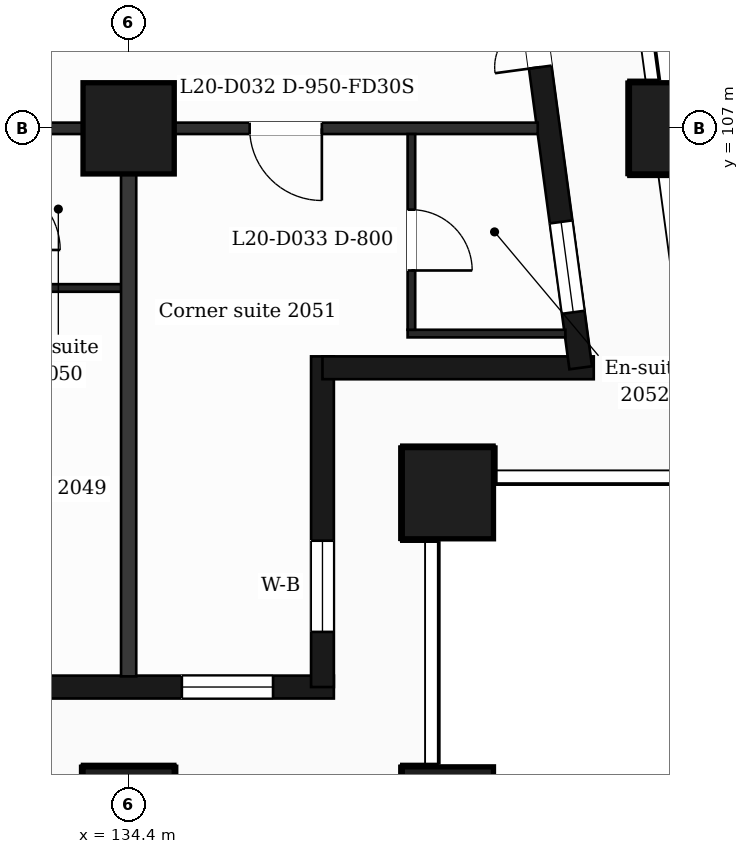
"""IFC4 building model, lengths in metres.
Left out: names, types, materials, properties, quantities, classifications, styles, units other than length and angle.
Written with IfcOpenShell. Run it as: python <this file> out.ifc"""

import sys

from ifc_helpers import new_model, si_unit, direction, frame, frame_2d, origin, origin_2d, place, context, subcontext, project, spatial, rectangle, extrude, element, fill, save


model = new_model("IFC4")
c1 = context("Model", 3, precision=1e-05, world=origin(), true_north=direction((0.0, 1.0)))
c2 = subcontext(c1, "Body", "Model", "MODEL_VIEW")
j1 = project(units=[si_unit("LENGTHUNIT", "METRE"), si_unit("PLANEANGLEUNIT", "RADIAN")], contexts=[c1])
p1 = place(None, origin())
s1 = spatial("IfcSite", under=j1, at=p1, CompositionType="ELEMENT")
p2 = place(p1, origin())
s2 = spatial("IfcBuilding", under=s1, at=p2, CompositionType="ELEMENT")
p3 = place(p2, frame((0.0, 0.0, 91.0)))
s3 = spatial("IfcBuildingStorey", under=s2, at=p3, CompositionType="ELEMENT", Elevation=91.0)
for number, where, z_axis, x_axis in (
    (1, (134.4, 98.0, 0.0), (0.0, 0.0, 1.0), (1.0, 0.0, 0.0)),
    (2, (138.6, 98.0, 0.0), (0.0, 0.0, 1.0), (1.0, 0.0, 0.0)),
    (3, (138.6, 102.2, 0.0), (0.0, 0.0, 1.0), (1.0, 0.0, 0.0)),
    (4, (134.4, 107.0, 0.0), (0.0, 0.0, 1.0), (1.0, 0.0, 0.0)),
    (5, (141.588, 107.0, 0.0), (0.0, 0.0, 1.0), (1.0, 0.0, 0.0)),
):
    element("IfcColumn", number, at=place(p3, frame(where, z_axis=z_axis, x_axis=x_axis)), inside=s3, PredefinedType="COLUMN", context=c2, shape_type="SweptSolid", body=[
        extrude(rectangle(XDim=1.2, YDim=1.2, at=origin_2d()), origin(), (0.0, 0.0, 1.0), 3.7),
    ])
p4 = place(p3, frame((89.85, 99.65, 0.0), z_axis=(0.0, 0.0, 1.0), x_axis=(1.0, 0.0, 0.0)))
e6 = element("IfcWall", 6, at=p4, inside=s3, PredefinedType="SOLIDWALL", context=c2, shape_type="SweptSolid", body=[
    extrude(rectangle(XDim=47.25, YDim=0.3, at=frame_2d((23.625, 0.0))), origin(), (0.0, 0.0, 1.0), 3.38),
])
p5 = place(p4, frame((0.725, 0.0, 0.9)))
e7 = element("IfcOpeningElement", 7, at=p5, cuts=e6, PredefinedType="OPENING", context=c2, shape_type="SweptSolid", body=[
    extrude(rectangle(XDim=1.2, YDim=2.1, at=frame_2d((0.6, 1.05))), frame((0.0, 0.16, 0.0), z_axis=(0.0, -1.0, 0.0), x_axis=(1.0, 0.0, 0.0)), (0.0, 0.0, 1.0), 0.32),
])
p6 = place(p4, frame((3.45, 0.0, 0.9)))
e8 = element("IfcOpeningElement", 8, at=p6, cuts=e6, PredefinedType="OPENING", context=c2, shape_type="SweptSolid", body=[
    extrude(rectangle(XDim=2.4, YDim=2.1, at=frame_2d((1.2, 1.05))), frame((0.0, 0.16, 0.0), z_axis=(0.0, -1.0, 0.0), x_axis=(1.0, 0.0, 0.0)), (0.0, 0.0, 1.0), 0.32),
])
p7 = place(p4, frame((7.65, 0.0, 0.9)))
e9 = element("IfcOpeningElement", 9, at=p7, cuts=e6, PredefinedType="OPENING", context=c2, shape_type="SweptSolid", body=[
    extrude(rectangle(XDim=2.4, YDim=2.1, at=frame_2d((1.2, 1.05))), frame((0.0, 0.16, 0.0), z_axis=(0.0, -1.0, 0.0), x_axis=(1.0, 0.0, 0.0)), (0.0, 0.0, 1.0), 0.32),
])
p8 = place(p4, frame((12.45, 0.0, 0.9)))
e10 = element("IfcOpeningElement", 10, at=p8, cuts=e6, PredefinedType="OPENING", context=c2, shape_type="SweptSolid", body=[
    extrude(rectangle(XDim=1.2, YDim=2.1, at=frame_2d((0.6, 1.05))), frame((0.0, 0.16, 0.0), z_axis=(0.0, -1.0, 0.0), x_axis=(1.0, 0.0, 0.0)), (0.0, 0.0, 1.0), 0.32),
])
p9 = place(p4, frame((16.65, 0.0, 0.9)))
e11 = element("IfcOpeningElement", 11, at=p9, cuts=e6, PredefinedType="OPENING", context=c2, shape_type="SweptSolid", body=[
    extrude(rectangle(XDim=1.2, YDim=2.1, at=frame_2d((0.6, 1.05))), frame((0.0, 0.16, 0.0), z_axis=(0.0, -1.0, 0.0), x_axis=(1.0, 0.0, 0.0)), (0.0, 0.0, 1.0), 0.32),
])
p10 = place(p4, frame((19.95, 0.0, 0.0)))
e12 = element("IfcOpeningElement", 12, at=p10, cuts=e6, PredefinedType="OPENING", context=c2, shape_type="SweptSolid", body=[
    extrude(rectangle(XDim=1.2, YDim=2.4, at=frame_2d((0.6, 1.2))), frame((0.0, 0.16, 0.0), z_axis=(0.0, -1.0, 0.0), x_axis=(1.0, 0.0, 0.0)), (0.0, 0.0, 1.0), 0.32),
])
p11 = place(p4, frame((21.75, 0.0, 0.9)))
e13 = element("IfcOpeningElement", 13, at=p11, cuts=e6, PredefinedType="OPENING", context=c2, shape_type="SweptSolid", body=[
    extrude(rectangle(XDim=1.2, YDim=2.1, at=frame_2d((0.6, 1.05))), frame((0.0, 0.16, 0.0), z_axis=(0.0, -1.0, 0.0), x_axis=(1.0, 0.0, 0.0)), (0.0, 0.0, 1.0), 0.32),
])
p12 = place(p4, frame((24.45, 0.0, 0.9)))
e14 = element("IfcOpeningElement", 14, at=p12, cuts=e6, PredefinedType="OPENING", context=c2, shape_type="SweptSolid", body=[
    extrude(rectangle(XDim=2.4, YDim=2.1, at=frame_2d((1.2, 1.05))), frame((0.0, 0.16, 0.0), z_axis=(0.0, -1.0, 0.0), x_axis=(1.0, 0.0, 0.0)), (0.0, 0.0, 1.0), 0.32),
])
p13 = place(p4, frame((28.35, 0.0, 0.0)))
e15 = element("IfcOpeningElement", 15, at=p13, cuts=e6, PredefinedType="OPENING", context=c2, shape_type="SweptSolid", body=[
    extrude(rectangle(XDim=1.2, YDim=2.4, at=frame_2d((0.6, 1.2))), frame((0.0, 0.16, 0.0), z_axis=(0.0, -1.0, 0.0), x_axis=(1.0, 0.0, 0.0)), (0.0, 0.0, 1.0), 0.32),
])
p14 = place(p4, frame((30.15, 0.0, 0.9)))
e16 = element("IfcOpeningElement", 16, at=p14, cuts=e6, PredefinedType="OPENING", context=c2, shape_type="SweptSolid", body=[
    extrude(rectangle(XDim=1.2, YDim=2.1, at=frame_2d((0.6, 1.05))), frame((0.0, 0.16, 0.0), z_axis=(0.0, -1.0, 0.0), x_axis=(1.0, 0.0, 0.0)), (0.0, 0.0, 1.0), 0.32),
])
p15 = place(p4, frame((32.85, 0.0, 0.9)))
e17 = element("IfcOpeningElement", 17, at=p15, cuts=e6, PredefinedType="OPENING", context=c2, shape_type="SweptSolid", body=[
    extrude(rectangle(XDim=2.4, YDim=2.1, at=frame_2d((1.2, 1.05))), frame((0.0, 0.16, 0.0), z_axis=(0.0, -1.0, 0.0), x_axis=(1.0, 0.0, 0.0)), (0.0, 0.0, 1.0), 0.32),
])
p16 = place(p4, frame((37.05, 0.0, 0.9)))
e18 = element("IfcOpeningElement", 18, at=p16, cuts=e6, PredefinedType="OPENING", context=c2, shape_type="SweptSolid", body=[
    extrude(rectangle(XDim=2.4, YDim=2.1, at=frame_2d((1.2, 1.05))), frame((0.0, 0.16, 0.0), z_axis=(0.0, -1.0, 0.0), x_axis=(1.0, 0.0, 0.0)), (0.0, 0.0, 1.0), 0.32),
])
p17 = place(p4, frame((41.85, 0.0, 0.9)))
e19 = element("IfcOpeningElement", 19, at=p17, cuts=e6, PredefinedType="OPENING", context=c2, shape_type="SweptSolid", body=[
    extrude(rectangle(XDim=1.2, YDim=2.1, at=frame_2d((0.6, 1.05))), frame((0.0, 0.16, 0.0), z_axis=(0.0, -1.0, 0.0), x_axis=(1.0, 0.0, 0.0)), (0.0, 0.0, 1.0), 0.32),
])
p18 = place(p4, frame((45.25, 0.0, 0.9)))
e20 = element("IfcOpeningElement", 20, at=p18, cuts=e6, PredefinedType="OPENING", context=c2, shape_type="SweptSolid", body=[
    extrude(rectangle(XDim=1.2, YDim=2.1, at=frame_2d((0.6, 1.05))), frame((0.0, 0.16, 0.0), z_axis=(0.0, -1.0, 0.0), x_axis=(1.0, 0.0, 0.0)), (0.0, 0.0, 1.0), 0.32),
])
p19 = place(p3, frame((136.95, 99.65, 0.0), z_axis=(0.0, 0.0, 1.0), x_axis=(0.0, 1.0, 0.0)))
e21 = element("IfcWall", 21, at=p19, inside=s3, PredefinedType="SOLIDWALL", context=c2, shape_type="SweptSolid", body=[
    extrude(rectangle(XDim=4.35, YDim=0.3, at=frame_2d((2.175, 0.0))), origin(), (0.0, 0.0, 1.0), 3.38),
])
p20 = place(p19, frame((0.725, 0.0, 0.9)))
e22 = element("IfcOpeningElement", 22, at=p20, cuts=e21, PredefinedType="OPENING", context=c2, shape_type="SweptSolid", body=[
    extrude(rectangle(XDim=1.2, YDim=2.1, at=frame_2d((0.6, 1.05))), frame((0.0, 0.16, 0.0), z_axis=(0.0, -1.0, 0.0), x_axis=(1.0, 0.0, 0.0)), (0.0, 0.0, 1.0), 0.32),
])
p21 = place(p3, frame((136.95, 103.85, 0.0), z_axis=(0.0, 0.0, 1.0), x_axis=(1.0, 0.0, 0.0)))
e23 = element("IfcWall", 23, at=p21, inside=s3, PredefinedType="SOLIDWALL", context=c2, shape_type="SweptSolid", body=[
    extrude(rectangle(XDim=3.569, YDim=0.3, at=frame_2d((1.785, 0.0))), origin(), (0.0, 0.0, 1.0), 3.38),
])
p22 = place(p3, frame((140.348, 103.85, 0.0), z_axis=(0.0, 0.0, 1.0), x_axis=(-0.133431549479, 0.991058031401, 0.0)))
e24 = element("IfcWall", 24, at=p22, inside=s3, PredefinedType="SOLIDWALL", context=c2, shape_type="SweptSolid", body=[
    extrude(rectangle(XDim=6.609, YDim=0.3, at=frame_2d((3.304, 0.0))), origin(), (0.0, 0.0, 1.0), 3.38),
])
p23 = place(p22, frame((0.737, 0.0, 0.9)))
e25 = element("IfcOpeningElement", 25, at=p23, cuts=e24, PredefinedType="OPENING", context=c2, shape_type="SweptSolid", body=[
    extrude(rectangle(XDim=1.2, YDim=2.1, at=frame_2d((0.6, 1.05))), frame((0.0, 0.16, 0.0), z_axis=(0.0, -1.0, 0.0), x_axis=(1.0, 0.0, 0.0)), (0.0, 0.0, 1.0), 0.32),
])
p24 = place(p22, frame((3.991, 0.0, 0.0)))
e26 = element("IfcOpeningElement", 26, at=p24, cuts=e24, PredefinedType="OPENING", context=c2, shape_type="SweptSolid", body=[
    extrude(rectangle(XDim=1.2, YDim=2.4, at=frame_2d((0.6, 1.2))), frame((0.0, 0.16, 0.0), z_axis=(0.0, -1.0, 0.0), x_axis=(1.0, 0.0, 0.0)), (0.0, 0.0, 1.0), 0.32),
])
p25 = place(p3, frame((138.07, 104.3, 0.0), z_axis=(0.0, 0.0, 1.0), x_axis=(1.0, 0.0, 0.0)))
e27 = element("IfcWall", 27, at=p25, inside=s3, PredefinedType="PARTITIONING", context=c2, shape_type="SweptSolid", body=[
    extrude(rectangle(XDim=2.076, YDim=0.1, at=frame_2d((1.038, 0.0))), origin(), (0.0, 0.0, 1.0), 3.38),
])
p26 = place(p3, frame((132.55, 104.9, 0.0), z_axis=(0.0, 0.0, 1.0), x_axis=(1.0, 0.0, 0.0)))
e28 = element("IfcWall", 28, at=p26, inside=s3, PredefinedType="PARTITIONING", context=c2, shape_type="SweptSolid", body=[
    extrude(rectangle(XDim=1.85, YDim=0.1, at=frame_2d((0.925, 0.0))), origin(), (0.0, 0.0, 1.0), 3.38),
])
p27 = place(p3, frame((87.018, 107.0, 0.0), z_axis=(0.0, 0.0, 1.0), x_axis=(1.0, 0.0, 0.0)))
e29 = element("IfcWall", 29, at=p27, inside=s3, PredefinedType="PARTITIONING", context=c2, shape_type="SweptSolid", body=[
    extrude(rectangle(XDim=52.765, YDim=0.15, at=frame_2d((26.382, 0.0))), origin(), (0.0, 0.0, 1.0), 3.38),
])
p28 = place(p27, frame((1.276, 0.0, 0.0)))
e30 = element("IfcOpeningElement", 30, at=p28, cuts=e29, PredefinedType="OPENING", context=c2, shape_type="SweptSolid", body=[
    extrude(rectangle(XDim=0.95, YDim=2.1, at=frame_2d((0.475, 1.05))), frame((0.0, 0.085, 0.0), z_axis=(0.0, -1.0, 0.0), x_axis=(1.0, 0.0, 0.0)), (0.0, 0.0, 1.0), 0.17),
])
p29 = place(p27, frame((6.752, 0.0, 0.0)))
e31 = element("IfcOpeningElement", 31, at=p29, cuts=e29, PredefinedType="OPENING", context=c2, shape_type="SweptSolid", body=[
    extrude(rectangle(XDim=0.95, YDim=2.1, at=frame_2d((0.475, 1.05))), frame((0.0, 0.085, 0.0), z_axis=(0.0, -1.0, 0.0), x_axis=(1.0, 0.0, 0.0)), (0.0, 0.0, 1.0), 0.17),
])
p30 = place(p27, frame((11.982, 0.0, 0.0)))
e32 = element("IfcOpeningElement", 32, at=p30, cuts=e29, PredefinedType="OPENING", context=c2, shape_type="SweptSolid", body=[
    extrude(rectangle(XDim=0.95, YDim=2.1, at=frame_2d((0.475, 1.05))), frame((0.0, 0.085, 0.0), z_axis=(0.0, -1.0, 0.0), x_axis=(1.0, 0.0, 0.0)), (0.0, 0.0, 1.0), 0.17),
])
p31 = place(p27, frame((16.457, 0.0, 0.0)))
e33 = element("IfcOpeningElement", 33, at=p31, cuts=e29, PredefinedType="OPENING", context=c2, shape_type="SweptSolid", body=[
    extrude(rectangle(XDim=0.95, YDim=2.1, at=frame_2d((0.475, 1.05))), frame((0.0, 0.085, 0.0), z_axis=(0.0, -1.0, 0.0), x_axis=(1.0, 0.0, 0.0)), (0.0, 0.0, 1.0), 0.17),
])
p32 = place(p27, frame((24.857, 0.0, 0.0)))
e34 = element("IfcOpeningElement", 34, at=p32, cuts=e29, PredefinedType="OPENING", context=c2, shape_type="SweptSolid", body=[
    extrude(rectangle(XDim=0.95, YDim=2.1, at=frame_2d((0.475, 1.05))), frame((0.0, 0.085, 0.0), z_axis=(0.0, -1.0, 0.0), x_axis=(1.0, 0.0, 0.0)), (0.0, 0.0, 1.0), 0.17),
])
p33 = place(p27, frame((26.845, 0.0, 0.0)))
e35 = element("IfcOpeningElement", 35, at=p33, cuts=e29, PredefinedType="OPENING", context=c2, shape_type="SweptSolid", body=[
    extrude(rectangle(XDim=0.95, YDim=2.1, at=frame_2d((0.475, 1.05))), frame((0.0, 0.085, 0.0), z_axis=(0.0, -1.0, 0.0), x_axis=(1.0, 0.0, 0.0)), (0.0, 0.0, 1.0), 0.17),
])
p34 = place(p27, frame((33.557, 0.0, 0.0)))
e36 = element("IfcOpeningElement", 36, at=p34, cuts=e29, PredefinedType="OPENING", context=c2, shape_type="SweptSolid", body=[
    extrude(rectangle(XDim=0.95, YDim=2.1, at=frame_2d((0.475, 1.05))), frame((0.0, 0.085, 0.0), z_axis=(0.0, -1.0, 0.0), x_axis=(1.0, 0.0, 0.0)), (0.0, 0.0, 1.0), 0.17),
])
p35 = place(p27, frame((35.47, 0.0, 0.0)))
e37 = element("IfcOpeningElement", 37, at=p35, cuts=e29, PredefinedType="OPENING", context=c2, shape_type="SweptSolid", body=[
    extrude(rectangle(XDim=0.95, YDim=2.1, at=frame_2d((0.475, 1.05))), frame((0.0, 0.085, 0.0), z_axis=(0.0, -1.0, 0.0), x_axis=(1.0, 0.0, 0.0)), (0.0, 0.0, 1.0), 0.17),
])
p36 = place(p27, frame((41.432, 0.0, 0.0)))
e38 = element("IfcOpeningElement", 38, at=p36, cuts=e29, PredefinedType="OPENING", context=c2, shape_type="SweptSolid", body=[
    extrude(rectangle(XDim=0.95, YDim=2.1, at=frame_2d((0.475, 1.05))), frame((0.0, 0.085, 0.0), z_axis=(0.0, -1.0, 0.0), x_axis=(1.0, 0.0, 0.0)), (0.0, 0.0, 1.0), 0.17),
])
p37 = place(p27, frame((43.882, 0.0, 0.0)))
e39 = element("IfcOpeningElement", 39, at=p37, cuts=e29, PredefinedType="OPENING", context=c2, shape_type="SweptSolid", body=[
    extrude(rectangle(XDim=1.0, YDim=2.1, at=frame_2d((0.5, 1.05))), frame((0.0, 0.085, 0.0), z_axis=(0.0, -1.0, 0.0), x_axis=(1.0, 0.0, 0.0)), (0.0, 0.0, 1.0), 0.17),
])
p38 = place(p27, frame((48.974, 0.0, 0.0)))
e40 = element("IfcOpeningElement", 40, at=p38, cuts=e29, PredefinedType="OPENING", context=c2, shape_type="SweptSolid", body=[
    extrude(rectangle(XDim=0.95, YDim=2.1, at=frame_2d((0.475, 1.05))), frame((0.0, 0.085, 0.0), z_axis=(0.0, -1.0, 0.0), x_axis=(1.0, 0.0, 0.0)), (0.0, 0.0, 1.0), 0.17),
])
p39 = place(p3, frame((134.4, 99.79, 0.0), z_axis=(0.0, 0.0, 1.0), x_axis=(0.0, 1.0, 0.0)))
e41 = element("IfcWall", 41, at=p39, inside=s3, PredefinedType="PARTITIONING", context=c2, shape_type="SweptSolid", body=[
    extrude(rectangle(XDim=7.135, YDim=0.2, at=frame_2d((3.567, 0.0))), origin(), (0.0, 0.0, 1.0), 3.38),
])
p40 = place(p3, frame((138.12, 104.35, 0.0), z_axis=(0.0, 0.0, 1.0), x_axis=(0.0, 1.0, 0.0)))
e42 = element("IfcWall", 42, at=p40, inside=s3, PredefinedType="PARTITIONING", context=c2, shape_type="SweptSolid", body=[
    extrude(rectangle(XDim=2.575, YDim=0.1, at=frame_2d((1.288, 0.0))), origin(), (0.0, 0.0, 1.0), 3.38),
])
p41 = place(p40, frame((0.78, 0.0, 0.0)))
e43 = element("IfcOpeningElement", 43, at=p41, cuts=e42, PredefinedType="OPENING", context=c2, shape_type="SweptSolid", body=[
    extrude(rectangle(XDim=0.8, YDim=2.1, at=frame_2d((0.4, 1.05))), frame((0.0, 0.06, 0.0), z_axis=(0.0, -1.0, 0.0), x_axis=(1.0, 0.0, 0.0)), (0.0, 0.0, 1.0), 0.12),
])
p42 = place(p18, origin())
e44 = element("IfcWindow", 44, at=p42, inside=s3, PartitioningType="SINGLE_PANEL", PredefinedType="WINDOW", context=c2, shape_type="SweptSolid", body=[
    extrude(rectangle(XDim=1.2, YDim=2.1, at=frame_2d((0.6, 1.05))), frame((0.0, 0.03, 0.0), z_axis=(0.0, -1.0, 0.0), x_axis=(1.0, 0.0, 0.0)), (0.0, 0.0, 1.0), 0.06),
])
fill(e20, e44)
p43 = place(p20, origin())
e45 = element("IfcWindow", 45, at=p43, inside=s3, PartitioningType="SINGLE_PANEL", PredefinedType="WINDOW", context=c2, shape_type="SweptSolid", body=[
    extrude(rectangle(XDim=1.2, YDim=2.1, at=frame_2d((0.6, 1.05))), frame((0.0, 0.03, 0.0), z_axis=(0.0, -1.0, 0.0), x_axis=(1.0, 0.0, 0.0)), (0.0, 0.0, 1.0), 0.06),
])
fill(e22, e45)
p44 = place(p23, origin())
e46 = element("IfcWindow", 46, at=p44, inside=s3, PartitioningType="SINGLE_PANEL", PredefinedType="WINDOW", context=c2, shape_type="SweptSolid", body=[
    extrude(rectangle(XDim=1.2, YDim=2.1, at=frame_2d((0.6, 1.05))), frame((0.0, 0.03, 0.0), z_axis=(0.0, -1.0, 0.0), x_axis=(1.0, 0.0, 0.0)), (0.0, 0.0, 1.0), 0.06),
])
fill(e25, e46)
p45 = place(p24, origin())
e47 = element("IfcDoor", 47, at=p45, inside=s3, OperationType="DOUBLE_DOOR_SINGLE_SWING", PredefinedType="DOOR", context=c2, shape_type="SweptSolid", body=[
    extrude(rectangle(XDim=1.2, YDim=2.4, at=frame_2d((0.6, 1.2))), frame((0.0, 0.025, 0.0), z_axis=(0.0, -1.0, 0.0), x_axis=(1.0, 0.0, 0.0)), (0.0, 0.0, 1.0), 0.05),
])
fill(e26, e47)
p46 = place(p38, origin())
e48 = element("IfcDoor", 48, at=p46, inside=s3, OperationType="SINGLE_SWING_RIGHT", PredefinedType="DOOR", context=c2, shape_type="SweptSolid", body=[
    extrude(rectangle(XDim=0.95, YDim=2.1, at=frame_2d((0.475, 1.05))), frame((0.0, 0.025, 0.0), z_axis=(0.0, -1.0, 0.0), x_axis=(1.0, 0.0, 0.0)), (0.0, 0.0, 1.0), 0.05),
])
fill(e40, e48)
p47 = place(p41, origin())
e49 = element("IfcDoor", 49, at=p47, inside=s3, OperationType="SINGLE_SWING_LEFT", PredefinedType="DOOR", context=c2, shape_type="SweptSolid", body=[
    extrude(rectangle(XDim=0.8, YDim=2.1, at=frame_2d((0.4, 1.05))), frame((0.0, 0.025, 0.0), z_axis=(0.0, -1.0, 0.0), x_axis=(1.0, 0.0, 0.0)), (0.0, 0.0, 1.0), 0.05),
])
fill(e43, e49)
save(model, sys.argv[1])
